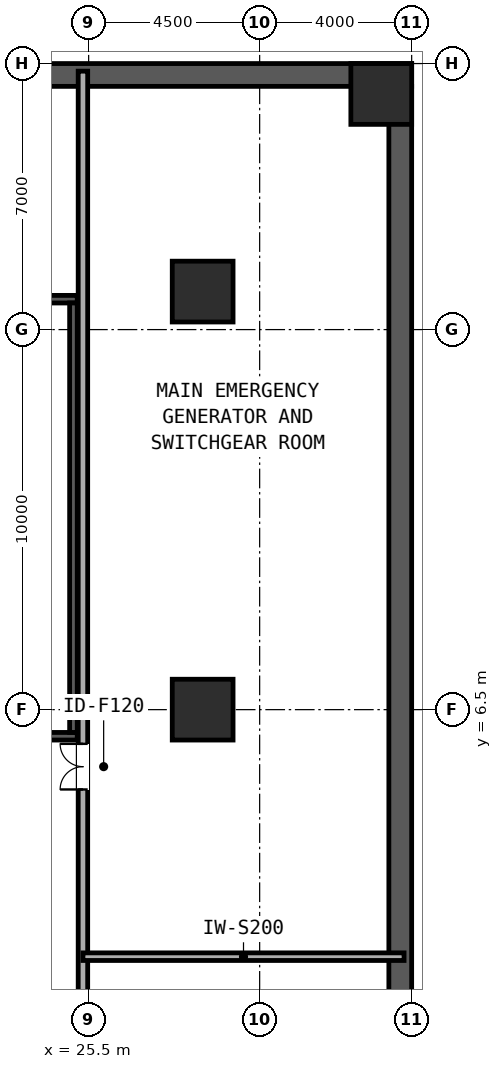
"""IFC4 building model, lengths in metres.
Left out: names, types, materials, properties, quantities, classifications, styles, units other than length and angle.
Written with IfcOpenShell. Run it as: python <this file> out.ifc"""

import sys

from ifc_helpers import new_model, si_unit, direction, frame, frame_2d, origin, origin_2d, place, context, subcontext, project, spatial, rectangle, extrude, element, fill, save


model = new_model("IFC4")
c1 = context("Model", 3, precision=1e-05, world=origin(), true_north=direction((0.0, 1.0)))
c2 = subcontext(c1, "Body", "Model", "MODEL_VIEW")
j1 = project(units=[si_unit("LENGTHUNIT", "METRE"), si_unit("PLANEANGLEUNIT", "RADIAN")], contexts=[c1])
p1 = place(None, origin())
s1 = spatial("IfcSite", under=j1, at=p1, CompositionType="ELEMENT")
p2 = place(p1, origin())
s2 = spatial("IfcBuilding", under=s1, at=p2, CompositionType="ELEMENT")
p3 = place(p2, frame((0.0, 0.0, -10.0)))
s3 = spatial("IfcBuildingStorey", under=s2, at=p3, CompositionType="ELEMENT", Elevation=-10.0)
for number, where, z_axis, x_axis in (
    (1, (19.55, 5.8, 0.0), (0.0, 0.0, 1.0), (1.0, 0.0, 0.0)),
    (2, (19.55, 17.3, 0.0), (0.0, 0.0, 1.0), (1.0, 0.0, 0.0)),
):
    element("IfcWall", number, at=place(p3, frame(where, z_axis=z_axis, x_axis=x_axis)), inside=s3, PredefinedType="SOLIDWALL", context=c2, shape_type="SweptSolid", body=[
        extrude(rectangle(XDim=5.65, YDim=0.2, at=frame_2d((2.825, 0.0))), origin(), (0.0, 0.0, 1.0), 4.48),
    ])
p4 = place(p3, frame((25.1, 5.9, 0.0), z_axis=(0.0, 0.0, 1.0), x_axis=(0.0, 1.0, 0.0)))
e3 = element("IfcWall", 3, at=p4, inside=s3, PredefinedType="SOLIDWALL", context=c2, shape_type="SweptSolid", body=[
    extrude(rectangle(XDim=11.3, YDim=0.2, at=frame_2d((5.65, 0.0))), origin(), (0.0, 0.0, 1.0), 4.48),
])
p5 = place(p3, frame((-34.0, 23.2, 0.0), z_axis=(0.0, 0.0, 1.0), x_axis=(1.0, 0.0, 0.0)))
e4 = element("IfcWall", 4, at=p5, inside=s3, PredefinedType="SOLIDWALL", context=c2, shape_type="SweptSolid", body=[
    extrude(rectangle(XDim=68.0, YDim=0.6, at=frame_2d((34.0, 0.0))), origin(), (0.0, 0.0, 1.0), 4.48),
])
p6 = place(p3, frame((33.7, -22.9, 0.0), z_axis=(0.0, 0.0, 1.0), x_axis=(0.0, 1.0, 0.0)))
e5 = element("IfcWall", 5, at=p6, inside=s3, PredefinedType="SOLIDWALL", context=c2, shape_type="SweptSolid", body=[
    extrude(rectangle(XDim=45.8, YDim=0.6, at=frame_2d((22.9, 0.0))), origin(), (0.0, 0.0, 1.0), 4.48),
])
for number, where, z_axis, x_axis in (
    (6, (33.2, 22.7, 0.0), (0.0, 0.0, 1.0), (1.0, 0.0, 0.0)),
    (7, (28.5, 6.5, 0.0), (0.0, 0.0, 1.0), (1.0, 0.0, 0.0)),
    (8, (28.5, 17.5, 0.0), (0.0, 0.0, 1.0), (1.0, 0.0, 0.0)),
):
    element("IfcColumn", number, at=place(p3, frame(where, z_axis=z_axis, x_axis=x_axis)), inside=s3, PredefinedType="COLUMN", context=c2, shape_type="SweptSolid", body=[
        extrude(rectangle(XDim=1.6, YDim=1.6, at=origin_2d()), origin(), (0.0, 0.0, 1.0), 4.8),
    ])
p7 = place(p3, frame((25.35, -23.3, 0.0), z_axis=(0.0, 0.0, 1.0), x_axis=(0.0, 1.0, 0.0)))
e9 = element("IfcWall", 9, at=p7, inside=s3, PredefinedType="PARTITIONING", context=c2, shape_type="SweptSolid", body=[
    extrude(rectangle(XDim=46.6, YDim=0.25, at=frame_2d((23.3, 0.0))), origin(), (0.0, 0.0, 1.0), 3.522),
])
p8 = place(p7, frame((7.2, 0.0, 0.0)))
e10 = element("IfcOpeningElement", 10, at=p8, cuts=e9, PredefinedType="OPENING", context=c2, shape_type="SweptSolid", body=[
    extrude(rectangle(XDim=1.2, YDim=2.2, at=frame_2d((0.6, 1.1))), frame((0.0, 0.135, 0.0), z_axis=(0.0, -1.0, 0.0), x_axis=(1.0, 0.0, 0.0)), (0.0, 0.0, 1.0), 0.27),
])
p9 = place(p7, frame((27.7, 0.0, 0.0)))
e11 = element("IfcOpeningElement", 11, at=p9, cuts=e9, PredefinedType="OPENING", context=c2, shape_type="SweptSolid", body=[
    extrude(rectangle(XDim=1.2, YDim=2.2, at=frame_2d((0.6, 1.1))), frame((0.0, 0.135, 0.0), z_axis=(0.0, -1.0, 0.0), x_axis=(1.0, 0.0, 0.0)), (0.0, 0.0, 1.0), 0.27),
])
p10 = place(p3, frame((25.35, 0.0, 0.0), z_axis=(0.0, 0.0, 1.0), x_axis=(1.0, 0.0, 0.0)))
e12 = element("IfcWall", 12, at=p10, inside=s3, PredefinedType="PARTITIONING", context=c2, shape_type="SweptSolid", body=[
    extrude(rectangle(XDim=8.45, YDim=0.2, at=frame_2d((4.225, 0.0))), origin(), (0.0, 0.0, 1.0), 3.61),
])
p11 = place(p9, origin())
e13 = element("IfcDoor", 13, at=p11, inside=s3, OperationType="DOUBLE_DOOR_SINGLE_SWING", PredefinedType="DOOR", context=c2, shape_type="SweptSolid", body=[
    extrude(rectangle(XDim=1.2, YDim=2.2, at=frame_2d((0.6, 1.1))), frame((0.0, 0.025, 0.0), z_axis=(0.0, -1.0, 0.0), x_axis=(1.0, 0.0, 0.0)), (0.0, 0.0, 1.0), 0.05),
])
fill(e11, e13)
save(model, sys.argv[1])
